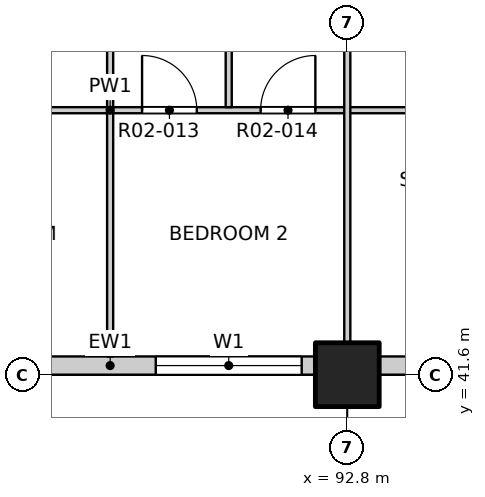
"""IFC4 building model, lengths in metres.
Left out: names, types, materials, properties, quantities, classifications, styles, units other than length and angle.
Written with IfcOpenShell. Run it as: python <this file> out.ifc"""

import sys

from ifc_helpers import new_model, si_unit, direction, frame, frame_2d, origin, origin_2d, place, context, subcontext, project, spatial, rectangle, extrude, element, fill, save


model = new_model("IFC4")
c1 = context("Model", 3, precision=1e-05, world=origin(), true_north=direction((0.0, 1.0)))
c2 = subcontext(c1, "Body", "Model", "MODEL_VIEW")
j1 = project(units=[si_unit("LENGTHUNIT", "METRE"), si_unit("PLANEANGLEUNIT", "RADIAN")], contexts=[c1])
p1 = place(None, origin())
s1 = spatial("IfcSite", under=j1, at=p1, CompositionType="ELEMENT")
p2 = place(p1, origin())
s2 = spatial("IfcBuilding", under=s1, at=p2, CompositionType="ELEMENT")
p3 = place(p2, frame((0.0, 0.0, 36.5)))
s3 = spatial("IfcBuildingStorey", under=s2, at=p3, CompositionType="ELEMENT", Elevation=36.5)
p4 = place(p3, frame((92.8, 41.6, -0.25), z_axis=(0.0, 0.0, 1.0), x_axis=(1.0, 0.0, 0.0)))
e1 = element("IfcColumn", 1, at=p4, inside=s3, PredefinedType="COLUMN", context=c2, shape_type="SweptSolid", body=[
    extrude(rectangle(XDim=1.05, YDim=1.05, at=origin_2d()), origin(), (0.0, 0.0, 1.0), 3.4),
])
p5 = place(p3, frame((85.525, 41.75, 0.0), z_axis=(0.0, 0.0, 1.0), x_axis=(1.0, 0.0, 0.0)))
e2 = element("IfcWall", 2, at=p5, inside=s3, PredefinedType="SOLIDWALL", context=c2, shape_type="SweptSolid", body=[
    extrude(rectangle(XDim=6.75, YDim=0.3, at=frame_2d((3.375, 0.0))), origin(), (0.0, 0.0, 1.0), 2.7),
])
p6 = place(p5, frame((0.525, 0.0, 0.0)))
e3 = element("IfcOpeningElement", 3, at=p6, cuts=e2, PredefinedType="OPENING", context=c2, shape_type="SweptSolid", body=[
    extrude(rectangle(XDim=1.8, YDim=2.4, at=frame_2d((0.9, 1.2))), frame((0.0, 0.16, 0.0), z_axis=(0.0, -1.0, 0.0), x_axis=(1.0, 0.0, 0.0)), (0.0, 0.0, 1.0), 0.32),
])
p7 = place(p5, frame((4.125, 0.0, 0.9)))
e4 = element("IfcOpeningElement", 4, at=p7, cuts=e2, PredefinedType="OPENING", context=c2, shape_type="SweptSolid", body=[
    extrude(rectangle(XDim=2.4, YDim=1.8, at=frame_2d((1.2, 0.9))), frame((0.0, 0.16, 0.0), z_axis=(0.0, -1.0, 0.0), x_axis=(1.0, 0.0, 0.0)), (0.0, 0.0, 1.0), 0.32),
])
p8 = place(p3, frame((93.325, 41.75, 0.0), z_axis=(0.0, 0.0, 1.0), x_axis=(1.0, 0.0, 0.0)))
e5 = element("IfcWall", 5, at=p8, inside=s3, PredefinedType="SOLIDWALL", context=c2, shape_type="SweptSolid", body=[
    extrude(rectangle(XDim=6.75, YDim=0.3, at=frame_2d((3.375, 0.0))), origin(), (0.0, 0.0, 1.0), 2.7),
])
p9 = place(p8, frame((0.525, 0.0, 0.0)))
e6 = element("IfcOpeningElement", 6, at=p9, cuts=e5, PredefinedType="OPENING", context=c2, shape_type="SweptSolid", body=[
    extrude(rectangle(XDim=1.8, YDim=2.4, at=frame_2d((0.9, 1.2))), frame((0.0, 0.16, 0.0), z_axis=(0.0, -1.0, 0.0), x_axis=(1.0, 0.0, 0.0)), (0.0, 0.0, 1.0), 0.32),
])
p10 = place(p8, frame((4.125, 0.0, 0.9)))
e7 = element("IfcOpeningElement", 7, at=p10, cuts=e5, PredefinedType="OPENING", context=c2, shape_type="SweptSolid", body=[
    extrude(rectangle(XDim=2.4, YDim=1.8, at=frame_2d((1.2, 0.9))), frame((0.0, 0.16, 0.0), z_axis=(0.0, -1.0, 0.0), x_axis=(1.0, 0.0, 0.0)), (0.0, 0.0, 1.0), 0.32),
])
p11 = place(p3, frame((81.0, 45.95, 0.0), z_axis=(0.0, 0.0, 1.0), x_axis=(1.0, 0.0, 0.0)))
e8 = element("IfcWall", 8, at=p11, inside=s3, PredefinedType="PARTITIONING", context=c2, shape_type="SweptSolid", body=[
    extrude(rectangle(XDim=15.8, YDim=0.1, at=frame_2d((7.9, 0.0))), origin(), (0.0, 0.0, 1.0), 3.15),
])
p12 = place(p11, frame((0.625, 0.0, 0.0)))
e9 = element("IfcOpeningElement", 9, at=p12, cuts=e8, PredefinedType="OPENING", context=c2, shape_type="SweptSolid", body=[
    extrude(rectangle(XDim=0.9, YDim=2.1, at=frame_2d((0.45, 1.05))), frame((0.0, 0.06, 0.0), z_axis=(0.0, -1.0, 0.0), x_axis=(1.0, 0.0, 0.0)), (0.0, 0.0, 1.0), 0.12),
])
p13 = place(p11, frame((2.575, 0.0, 0.0)))
e10 = element("IfcOpeningElement", 10, at=p13, cuts=e8, PredefinedType="OPENING", context=c2, shape_type="SweptSolid", body=[
    extrude(rectangle(XDim=0.9, YDim=2.1, at=frame_2d((0.45, 1.05))), frame((0.0, 0.06, 0.0), z_axis=(0.0, -1.0, 0.0), x_axis=(1.0, 0.0, 0.0)), (0.0, 0.0, 1.0), 0.12),
])
p14 = place(p11, frame((5.35, 0.0, 0.0)))
e11 = element("IfcOpeningElement", 11, at=p14, cuts=e8, PredefinedType="OPENING", context=c2, shape_type="SweptSolid", body=[
    extrude(rectangle(XDim=1.2, YDim=2.1, at=frame_2d((0.6, 1.05))), frame((0.0, 0.06, 0.0), z_axis=(0.0, -1.0, 0.0), x_axis=(1.0, 0.0, 0.0)), (0.0, 0.0, 1.0), 0.12),
])
p15 = place(p11, frame((8.425, 0.0, 0.0)))
e12 = element("IfcOpeningElement", 12, at=p15, cuts=e8, PredefinedType="OPENING", context=c2, shape_type="SweptSolid", body=[
    extrude(rectangle(XDim=0.9, YDim=2.1, at=frame_2d((0.45, 1.05))), frame((0.0, 0.06, 0.0), z_axis=(0.0, -1.0, 0.0), x_axis=(1.0, 0.0, 0.0)), (0.0, 0.0, 1.0), 0.12),
])
p16 = place(p11, frame((10.375, 0.0, 0.0)))
e13 = element("IfcOpeningElement", 13, at=p16, cuts=e8, PredefinedType="OPENING", context=c2, shape_type="SweptSolid", body=[
    extrude(rectangle(XDim=0.9, YDim=2.1, at=frame_2d((0.45, 1.05))), frame((0.0, 0.06, 0.0), z_axis=(0.0, -1.0, 0.0), x_axis=(1.0, 0.0, 0.0)), (0.0, 0.0, 1.0), 0.12),
])
p17 = place(p11, frame((13.15, 0.0, 0.0)))
e14 = element("IfcOpeningElement", 14, at=p17, cuts=e8, PredefinedType="OPENING", context=c2, shape_type="SweptSolid", body=[
    extrude(rectangle(XDim=1.2, YDim=2.1, at=frame_2d((0.6, 1.05))), frame((0.0, 0.06, 0.0), z_axis=(0.0, -1.0, 0.0), x_axis=(1.0, 0.0, 0.0)), (0.0, 0.0, 1.0), 0.12),
])
p18 = place(p3, frame((88.9, 41.9, 0.0), z_axis=(0.0, 0.0, 1.0), x_axis=(0.0, 1.0, 0.0)))
e15 = element("IfcWall", 15, at=p18, inside=s3, PredefinedType="PARTITIONING", context=c2, shape_type="SweptSolid", body=[
    extrude(rectangle(XDim=7.45, YDim=0.1, at=frame_2d((3.725, 0.0))), origin(), (0.0, 0.0, 1.0), 3.15),
])
p19 = place(p3, frame((90.85, 46.0, 0.0), z_axis=(0.0, 0.0, 1.0), x_axis=(0.0, 1.0, 0.0)))
e16 = element("IfcWall", 16, at=p19, inside=s3, PredefinedType="PARTITIONING", context=c2, shape_type="SweptSolid", body=[
    extrude(rectangle(XDim=3.35, YDim=0.1, at=frame_2d((1.675, 0.0))), origin(), (0.0, 0.0, 1.0), 3.15),
])
p20 = place(p3, frame((92.8, 41.9, 0.0), z_axis=(0.0, 0.0, 1.0), x_axis=(0.0, 1.0, 0.0)))
e17 = element("IfcWall", 17, at=p20, inside=s3, PredefinedType="PARTITIONING", context=c2, shape_type="SweptSolid", body=[
    extrude(rectangle(XDim=7.45, YDim=0.1, at=frame_2d((3.725, 0.0))), origin(), (0.0, 0.0, 1.0), 2.55),
])
p21 = place(p7, origin())
e18 = element("IfcWindow", 18, at=p21, inside=s3, PartitioningType="DOUBLE_PANEL_VERTICAL", PredefinedType="WINDOW", context=c2, shape_type="SweptSolid", body=[
    extrude(rectangle(XDim=2.4, YDim=1.8, at=frame_2d((1.2, 0.9))), frame((0.0, 0.03, 0.0), z_axis=(0.0, -1.0, 0.0), x_axis=(1.0, 0.0, 0.0)), (0.0, 0.0, 1.0), 0.06),
])
fill(e4, e18)
p22 = place(p15, origin())
e19 = element("IfcDoor", 19, at=p22, inside=s3, OperationType="SINGLE_SWING_LEFT", PredefinedType="DOOR", context=c2, shape_type="SweptSolid", body=[
    extrude(rectangle(XDim=0.9, YDim=2.1, at=frame_2d((0.45, 1.05))), frame((0.0, 0.025, 0.0), z_axis=(0.0, -1.0, 0.0), x_axis=(1.0, 0.0, 0.0)), (0.0, 0.0, 1.0), 0.05),
])
fill(e12, e19)
p23 = place(p16, origin())
e20 = element("IfcDoor", 20, at=p23, inside=s3, OperationType="SINGLE_SWING_RIGHT", PredefinedType="DOOR", context=c2, shape_type="SweptSolid", body=[
    extrude(rectangle(XDim=0.9, YDim=2.1, at=frame_2d((0.45, 1.05))), frame((0.0, 0.025, 0.0), z_axis=(0.0, -1.0, 0.0), x_axis=(1.0, 0.0, 0.0)), (0.0, 0.0, 1.0), 0.05),
])
fill(e13, e20)
save(model, sys.argv[1])
